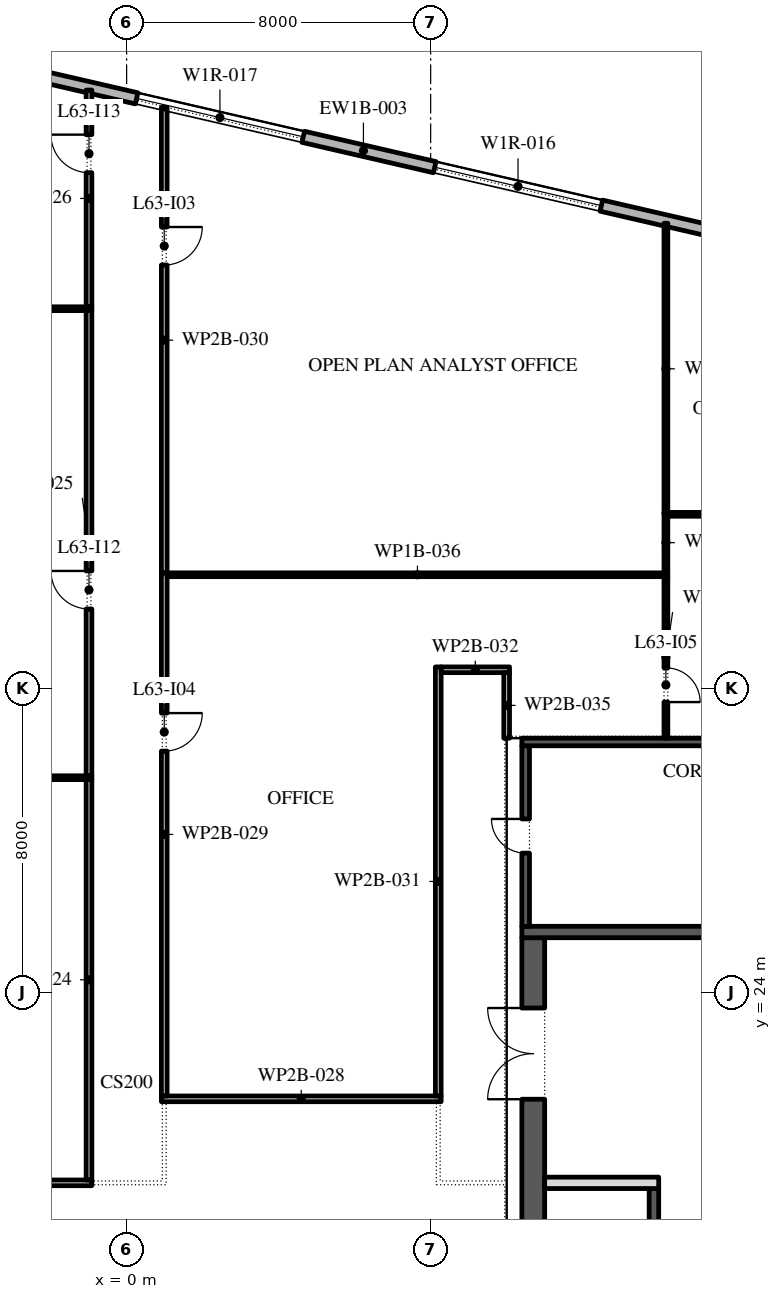
"""IFC4 building model, lengths in metres.
Left out: names, types, materials, properties, quantities, classifications, styles, units other than length and angle.
Written with IfcOpenShell. Run it as: python <this file> out.ifc"""

import sys

from ifc_helpers import new_model, si_unit, direction, frame, frame_2d, origin, place, context, subcontext, project, spatial, rectangle, extrude, element, fill, save


model = new_model("IFC4")
c1 = context("Model", 3, precision=1e-05, world=origin(), true_north=direction((0.0, 1.0)))
c2 = subcontext(c1, "Body", "Model", "MODEL_VIEW")
j1 = project(units=[si_unit("LENGTHUNIT", "METRE"), si_unit("PLANEANGLEUNIT", "RADIAN")], contexts=[c1])
p1 = place(None, origin())
s1 = spatial("IfcSite", under=j1, at=p1, CompositionType="ELEMENT")
p2 = place(p1, origin())
s2 = spatial("IfcBuilding", under=s1, at=p2, CompositionType="ELEMENT")
p3 = place(p2, frame((0.0, 0.0, 289.2)))
s3 = spatial("IfcBuildingStorey", under=s2, at=p3, CompositionType="ELEMENT", Elevation=289.2)
p4 = place(p3, frame((29.616, 40.758, 0.0), z_axis=(0.0, 0.0, 1.0), x_axis=(-0.974370532314, 0.224949029246, 0.0)))
e1 = element("IfcWall", 1, at=p4, inside=s3, PredefinedType="STANDARD", context=c2, shape_type="SweptSolid", body=[
    extrude(rectangle(XDim=48.0, YDim=0.3, at=frame_2d((24.0, 0.0))), origin(), (0.0, 0.0, 1.0), 3.95),
])
p5 = place(p4, frame((1.625, 0.0, 0.45)))
e2 = element("IfcOpeningElement", 2, at=p5, cuts=e1, PredefinedType="OPENING", context=c2, shape_type="SweptSolid", body=[
    extrude(rectangle(XDim=4.5, YDim=2.475, at=frame_2d((2.25, 1.238))), frame((0.0, 0.16, 0.0), z_axis=(0.0, -1.0, 0.0), x_axis=(1.0, 0.0, 0.0)), (0.0, 0.0, 1.0), 0.32),
])
p6 = place(p4, frame((10.575, 0.0, 0.0)))
e3 = element("IfcOpeningElement", 3, at=p6, cuts=e1, PredefinedType="OPENING", context=c2, shape_type="SweptSolid", body=[
    extrude(rectangle(XDim=2.4, YDim=3.5, at=frame_2d((1.2, 1.75))), frame((0.0, 0.16, 0.0), z_axis=(0.0, -1.0, 0.0), x_axis=(1.0, 0.0, 0.0)), (0.0, 0.0, 1.0), 0.32),
])
p7 = place(p4, frame((17.575, 0.0, 0.45)))
e4 = element("IfcOpeningElement", 4, at=p7, cuts=e1, PredefinedType="OPENING", context=c2, shape_type="SweptSolid", body=[
    extrude(rectangle(XDim=4.5, YDim=2.4, at=frame_2d((2.25, 1.2))), frame((0.0, 0.16, 0.0), z_axis=(0.0, -1.0, 0.0), x_axis=(1.0, 0.0, 0.0)), (0.0, 0.0, 1.0), 0.32),
])
p8 = place(p4, frame((25.625, 0.0, 0.45)))
e5 = element("IfcOpeningElement", 5, at=p8, cuts=e1, PredefinedType="OPENING", context=c2, shape_type="SweptSolid", body=[
    extrude(rectangle(XDim=4.5, YDim=2.4, at=frame_2d((2.25, 1.2))), frame((0.0, 0.16, 0.0), z_axis=(0.0, -1.0, 0.0), x_axis=(1.0, 0.0, 0.0)), (0.0, 0.0, 1.0), 0.32),
])
p9 = place(p4, frame((33.675, 0.0, 0.45)))
e6 = element("IfcOpeningElement", 6, at=p9, cuts=e1, PredefinedType="OPENING", context=c2, shape_type="SweptSolid", body=[
    extrude(rectangle(XDim=4.5, YDim=2.4, at=frame_2d((2.25, 1.2))), frame((0.0, 0.16, 0.0), z_axis=(0.0, -1.0, 0.0), x_axis=(1.0, 0.0, 0.0)), (0.0, 0.0, 1.0), 0.32),
])
p10 = place(p4, frame((42.775, 0.0, 0.0)))
e7 = element("IfcOpeningElement", 7, at=p10, cuts=e1, PredefinedType="OPENING", context=c2, shape_type="SweptSolid", body=[
    extrude(rectangle(XDim=2.4, YDim=2.85, at=frame_2d((1.2, 1.425))), frame((0.0, 0.16, 0.0), z_axis=(0.0, -1.0, 0.0), x_axis=(1.0, 0.0, 0.0)), (0.0, 0.0, 1.0), 0.32),
])
p11 = place(p3, frame((10.7, -2.45, 0.0), z_axis=(0.0, 0.0, 1.0), x_axis=(0.0, 1.0, 0.0)))
e8 = element("IfcWall", 8, at=p11, inside=s3, PredefinedType="SHEAR", context=c2, shape_type="SweptSolid", body=[
    extrude(rectangle(XDim=27.9, YDim=0.6, at=frame_2d((13.95, 0.0))), origin(), (0.0, 0.0, 1.0), 3.95),
])
p12 = place(p11, frame((23.65, 0.0, 0.0)))
e9 = element("IfcOpeningElement", 9, at=p12, cuts=e8, PredefinedType="OPENING", context=c2, shape_type="SweptSolid", body=[
    extrude(rectangle(XDim=2.4, YDim=2.1, at=frame_2d((1.2, 1.05))), frame((0.0, 0.31, 0.0), z_axis=(0.0, -1.0, 0.0), x_axis=(1.0, 0.0, 0.0)), (0.0, 0.0, 1.0), 0.62),
])
p13 = place(p11, frame((1.387, 0.0, 0.0)))
e10 = element("IfcOpeningElement", 10, at=p13, cuts=e8, PredefinedType="OPENING", context=c2, shape_type="SweptSolid", body=[
    extrude(rectangle(XDim=0.9, YDim=2.1, at=frame_2d((0.45, 1.05))), frame((0.0, 0.31, 0.0), z_axis=(0.0, -1.0, 0.0), x_axis=(1.0, 0.0, 0.0)), (0.0, 0.0, 1.0), 0.62),
])
p14 = place(p11, frame((4.562, 0.0, 0.0)))
e11 = element("IfcOpeningElement", 11, at=p14, cuts=e8, PredefinedType="OPENING", context=c2, shape_type="SweptSolid", body=[
    extrude(rectangle(XDim=1.0, YDim=2.1, at=frame_2d((0.5, 1.05))), frame((0.0, 0.31, 0.0), z_axis=(0.0, -1.0, 0.0), x_axis=(1.0, 0.0, 0.0)), (0.0, 0.0, 1.0), 0.62),
])
p15 = place(p3, frame((10.4, 25.6, 0.0), z_axis=(0.0, 0.0, 1.0), x_axis=(1.0, 0.0, 0.0)))
e12 = element("IfcWall", 12, at=p15, inside=s3, PredefinedType="SHEAR", context=c2, shape_type="SweptSolid", body=[
    extrude(rectangle(XDim=11.2, YDim=0.3, at=frame_2d((5.6, 0.0))), origin(), (0.0, 0.0, 1.0), 3.95),
])
p16 = place(p3, frame((13.875, -2.45, 0.0), z_axis=(0.0, 0.0, 1.0), x_axis=(0.0, 1.0, 0.0)))
e13 = element("IfcWall", 13, at=p16, inside=s3, PredefinedType="SHEAR", context=c2, shape_type="SweptSolid", body=[
    extrude(rectangle(XDim=21.3, YDim=0.25, at=frame_2d((10.65, 0.0))), origin(), (0.0, 0.0, 1.0), 3.95),
])
p17 = place(p16, frame((17.786, 0.0, 0.0)))
e14 = element("IfcOpeningElement", 14, at=p17, cuts=e13, PredefinedType="OPENING", context=c2, shape_type="SweptSolid", body=[
    extrude(rectangle(XDim=0.9, YDim=2.1, at=frame_2d((0.45, 1.05))), frame((0.0, 0.135, 0.0), z_axis=(0.0, -1.0, 0.0), x_axis=(1.0, 0.0, 0.0)), (0.0, 0.0, 1.0), 0.27),
])
p18 = place(p16, frame((6.971, 0.0, 0.0)))
e15 = element("IfcOpeningElement", 15, at=p18, cuts=e13, PredefinedType="OPENING", context=c2, shape_type="SweptSolid", body=[
    extrude(rectangle(XDim=1.1, YDim=2.1, at=frame_2d((0.55, 1.05))), frame((0.0, 0.135, 0.0), z_axis=(0.0, -1.0, 0.0), x_axis=(1.0, 0.0, 0.0)), (0.0, 0.0, 1.0), 0.27),
])
p19 = place(p16, frame((9.114, 0.0, 0.0)))
e16 = element("IfcOpeningElement", 16, at=p19, cuts=e13, PredefinedType="OPENING", context=c2, shape_type="SweptSolid", body=[
    extrude(rectangle(XDim=1.1, YDim=2.1, at=frame_2d((0.55, 1.05))), frame((0.0, 0.135, 0.0), z_axis=(0.0, -1.0, 0.0), x_axis=(1.0, 0.0, 0.0)), (0.0, 0.0, 1.0), 0.27),
])
p20 = place(p16, frame((11.257, 0.0, 0.0)))
e17 = element("IfcOpeningElement", 17, at=p20, cuts=e13, PredefinedType="OPENING", context=c2, shape_type="SweptSolid", body=[
    extrude(rectangle(XDim=1.1, YDim=2.1, at=frame_2d((0.55, 1.05))), frame((0.0, 0.135, 0.0), z_axis=(0.0, -1.0, 0.0), x_axis=(1.0, 0.0, 0.0)), (0.0, 0.0, 1.0), 0.27),
])
p21 = place(p16, frame((13.4, 0.0, 0.0)))
e18 = element("IfcOpeningElement", 18, at=p21, cuts=e13, PredefinedType="OPENING", context=c2, shape_type="SweptSolid", body=[
    extrude(rectangle(XDim=1.1, YDim=2.1, at=frame_2d((0.55, 1.05))), frame((0.0, 0.135, 0.0), z_axis=(0.0, -1.0, 0.0), x_axis=(1.0, 0.0, 0.0)), (0.0, 0.0, 1.0), 0.27),
])
p22 = place(p3, frame((11.0, 19.0, 0.0), z_axis=(0.0, 0.0, 1.0), x_axis=(1.0, 0.0, 0.0)))
e19 = element("IfcWall", 19, at=p22, inside=s3, PredefinedType="PARTITIONING", context=c2, shape_type="SweptSolid", body=[
    extrude(rectangle(XDim=3.0, YDim=0.3, at=frame_2d((1.5, 0.0))), origin(), (0.0, 0.0, 1.0), 3.95),
])
p23 = place(p3, frame((10.5, 25.75, 0.0), z_axis=(0.0, 0.0, 1.0), x_axis=(0.0, 1.0, 0.0)))
e20 = element("IfcWall", 20, at=p23, inside=s3, PredefinedType="SHEAR", context=c2, shape_type="SweptSolid", body=[
    extrude(rectangle(XDim=4.75, YDim=0.2, at=frame_2d((2.375, 0.0))), origin(), (0.0, 0.0, 1.0), 3.95),
])
p24 = place(p23, frame((1.925, 0.0, 0.0)))
e21 = element("IfcOpeningElement", 21, at=p24, cuts=e20, PredefinedType="OPENING", context=c2, shape_type="SweptSolid", body=[
    extrude(rectangle(XDim=0.9, YDim=2.1, at=frame_2d((0.45, 1.05))), frame((0.0, 0.11, 0.0), z_axis=(0.0, -1.0, 0.0), x_axis=(1.0, 0.0, 0.0)), (0.0, 0.0, 1.0), 0.22),
])
p25 = place(p3, frame((10.4, 30.6, 0.0), z_axis=(0.0, 0.0, 1.0), x_axis=(1.0, 0.0, 0.0)))
e22 = element("IfcWall", 22, at=p25, inside=s3, PredefinedType="SHEAR", context=c2, shape_type="SweptSolid", body=[
    extrude(rectangle(XDim=11.2, YDim=0.2, at=frame_2d((5.6, 0.0))), origin(), (0.0, 0.0, 1.0), 3.95),
])
p26 = place(p3, frame((-9.29, 42.0, 0.0), z_axis=(0.0, 0.0, 1.0), x_axis=(1.0, 0.0, 0.0)))
e23 = element("IfcWall", 23, at=p26, inside=s3, PredefinedType="PARTITIONING", context=c2, shape_type="SweptSolid", body=[
    extrude(rectangle(XDim=8.375, YDim=0.1, at=frame_2d((4.188, 0.0))), origin(), (0.0, 0.0, 1.0), 3.95),
])
p27 = place(p3, frame((-8.275, 19.0, 0.0), z_axis=(0.0, 0.0, 1.0), x_axis=(1.0, 0.0, 0.0)))
e24 = element("IfcWall", 24, at=p27, inside=s3, PredefinedType="PARTITIONING", context=c2, shape_type="SweptSolid", body=[
    extrude(rectangle(XDim=7.36, YDim=0.15, at=frame_2d((3.68, 0.0))), origin(), (0.0, 0.0, 1.0), 3.95),
])
p28 = place(p3, frame((-8.125, 29.66, 0.0), z_axis=(0.0, 0.0, 1.0), x_axis=(1.0, 0.0, 0.0)))
e25 = element("IfcWall", 25, at=p28, inside=s3, PredefinedType="PARTITIONING", context=c2, shape_type="SweptSolid", body=[
    extrude(rectangle(XDim=7.21, YDim=0.1, at=frame_2d((3.605, 0.0))), origin(), (0.0, 0.0, 1.0), 3.95),
])
p29 = place(p3, frame((-0.99, 19.075, 0.0), z_axis=(0.0, 0.0, 1.0), x_axis=(0.0, 1.0, 0.0)))
e26 = element("IfcWall", 26, at=p29, inside=s3, PredefinedType="PARTITIONING", context=c2, shape_type="SweptSolid", body=[
    extrude(rectangle(XDim=10.535, YDim=0.15, at=frame_2d((5.268, 0.0))), origin(), (0.0, 0.0, 1.0), 3.95),
])
p30 = place(p3, frame((-0.99, 29.71, 0.0), z_axis=(0.0, 0.0, 1.0), x_axis=(0.0, 1.0, 0.0)))
e27 = element("IfcWall", 27, at=p30, inside=s3, PredefinedType="PARTITIONING", context=c2, shape_type="SweptSolid", body=[
    extrude(rectangle(XDim=12.24, YDim=0.15, at=frame_2d((6.12, 0.0))), origin(), (0.0, 0.0, 1.0), 3.95),
])
p31 = place(p30, frame((4.39, 0.0, 0.0)))
e28 = element("IfcOpeningElement", 28, at=p31, cuts=e27, PredefinedType="OPENING", context=c2, shape_type="SweptSolid", body=[
    extrude(rectangle(XDim=1.0, YDim=2.1, at=frame_2d((0.5, 1.05))), frame((0.0, 0.085, 0.0), z_axis=(0.0, -1.0, 0.0), x_axis=(1.0, 0.0, 0.0)), (0.0, 0.0, 1.0), 0.17),
])
p32 = place(p3, frame((-0.99, 42.05, 0.0), z_axis=(0.0, 0.0, 1.0), x_axis=(0.0, 1.0, 0.0)))
e29 = element("IfcWall", 29, at=p32, inside=s3, PredefinedType="PARTITIONING", context=c2, shape_type="SweptSolid", body=[
    extrude(rectangle(XDim=5.703, YDim=0.15, at=frame_2d((2.852, 0.0))), origin(), (0.0, 0.0, 1.0), 3.95),
])
p33 = place(p32, frame((3.53, 0.0, 0.0)))
e30 = element("IfcOpeningElement", 30, at=p33, cuts=e29, PredefinedType="OPENING", context=c2, shape_type="SweptSolid", body=[
    extrude(rectangle(XDim=1.0, YDim=2.1, at=frame_2d((0.5, 1.05))), frame((0.0, 0.085, 0.0), z_axis=(0.0, -1.0, 0.0), x_axis=(1.0, 0.0, 0.0)), (0.0, 0.0, 1.0), 0.17),
])
p34 = place(p3, frame((0.915, 21.21, 0.0), z_axis=(0.0, 0.0, 1.0), x_axis=(1.0, 0.0, 0.0)))
e31 = element("IfcWall", 31, at=p34, inside=s3, PredefinedType="PARTITIONING", context=c2, shape_type="SweptSolid", body=[
    extrude(rectangle(XDim=7.36, YDim=0.15, at=frame_2d((3.68, 0.0))), origin(), (0.0, 0.0, 1.0), 3.95),
])
p35 = place(p3, frame((0.99, 35.05, 0.0), z_axis=(0.0, 0.0, 1.0), x_axis=(0.0, -1.0, 0.0)))
e32 = element("IfcWall", 32, at=p35, inside=s3, PredefinedType="PARTITIONING", context=c2, shape_type="SweptSolid", body=[
    extrude(rectangle(XDim=13.765, YDim=0.15, at=frame_2d((6.883, 0.0))), origin(), (0.0, 0.0, 1.0), 3.95),
])
p36 = place(p35, frame((3.69, 0.0, 0.0)))
e33 = element("IfcOpeningElement", 33, at=p36, cuts=e32, PredefinedType="OPENING", context=c2, shape_type="SweptSolid", body=[
    extrude(rectangle(XDim=1.0, YDim=2.1, at=frame_2d((0.5, 1.05))), frame((0.0, 0.085, 0.0), z_axis=(0.0, -1.0, 0.0), x_axis=(1.0, 0.0, 0.0)), (0.0, 0.0, 1.0), 0.17),
])
p37 = place(p3, frame((0.99, 47.296, 0.0), z_axis=(0.0, 0.0, 1.0), x_axis=(0.0, -1.0, 0.0)))
e34 = element("IfcWall", 34, at=p37, inside=s3, PredefinedType="PARTITIONING", context=c2, shape_type="SweptSolid", body=[
    extrude(rectangle(XDim=12.246, YDim=0.15, at=frame_2d((6.123, 0.0))), origin(), (0.0, 0.0, 1.0), 3.95),
])
p38 = place(p37, frame((3.146, 0.0, 0.0)))
e35 = element("IfcOpeningElement", 35, at=p38, cuts=e34, PredefinedType="OPENING", context=c2, shape_type="SweptSolid", body=[
    extrude(rectangle(XDim=1.0, YDim=2.1, at=frame_2d((0.5, 1.05))), frame((0.0, 0.085, 0.0), z_axis=(0.0, -1.0, 0.0), x_axis=(1.0, 0.0, 0.0)), (0.0, 0.0, 1.0), 0.17),
])
p39 = place(p3, frame((8.2, 21.285, 0.0), z_axis=(0.0, 0.0, 1.0), x_axis=(0.0, 1.0, 0.0)))
e36 = element("IfcWall", 36, at=p39, inside=s3, PredefinedType="PARTITIONING", context=c2, shape_type="SweptSolid", body=[
    extrude(rectangle(XDim=11.29, YDim=0.15, at=frame_2d((5.645, 0.0))), origin(), (0.0, 0.0, 1.0), 3.95),
])
p40 = place(p3, frame((8.275, 32.5, 0.0), z_axis=(0.0, 0.0, 1.0), x_axis=(1.0, 0.0, 0.0)))
e37 = element("IfcWall", 37, at=p40, inside=s3, PredefinedType="PARTITIONING", context=c2, shape_type="SweptSolid", body=[
    extrude(rectangle(XDim=1.8, YDim=0.15, at=frame_2d((0.9, 0.0))), origin(), (0.0, 0.0, 1.0), 3.95),
])
p41 = place(p3, frame((10.0, 32.425, 0.0), z_axis=(0.0, 0.0, 1.0), x_axis=(0.0, -1.0, 0.0)))
e38 = element("IfcWall", 38, at=p41, inside=s3, PredefinedType="PARTITIONING", context=c2, shape_type="SweptSolid", body=[
    extrude(rectangle(XDim=1.725, YDim=0.15, at=frame_2d((0.863, 0.0))), origin(), (0.0, 0.0, 1.0), 3.95),
])
p42 = place(p3, frame((14.24, 35.0, 0.0), z_axis=(0.0, 0.0, 1.0), x_axis=(-1.0, 0.0, 0.0)))
e39 = element("IfcWall", 39, at=p42, inside=s3, PredefinedType="PARTITIONING", context=c2, shape_type="SweptSolid", body=[
    extrude(rectangle(XDim=13.175, YDim=0.1, at=frame_2d((6.587, 0.0))), origin(), (0.0, 0.0, 1.0), 3.95),
])
p43 = place(p3, frame((14.19, 34.95, 0.0), z_axis=(0.0, 0.0, 1.0), x_axis=(0.0, -1.0, 0.0)))
e40 = element("IfcWall", 40, at=p43, inside=s3, PredefinedType="PARTITIONING", context=c2, shape_type="SweptSolid", body=[
    extrude(rectangle(XDim=4.25, YDim=0.1, at=frame_2d((2.125, 0.0))), origin(), (0.0, 0.0, 1.0), 2.97),
])
p44 = place(p43, frame((2.4, 0.0, 0.0)))
e41 = element("IfcOpeningElement", 41, at=p44, cuts=e40, PredefinedType="OPENING", context=c2, shape_type="SweptSolid", body=[
    extrude(rectangle(XDim=0.9, YDim=2.1, at=frame_2d((0.45, 1.05))), frame((0.0, 0.06, 0.0), z_axis=(0.0, -1.0, 0.0), x_axis=(1.0, 0.0, 0.0)), (0.0, 0.0, 1.0), 0.12),
])
p45 = place(p3, frame((14.19, 36.64, 0.0), z_axis=(0.0, 0.0, 1.0), x_axis=(0.0, -1.0, 0.0)))
e42 = element("IfcWall", 42, at=p45, inside=s3, PredefinedType="PARTITIONING", context=c2, shape_type="SweptSolid", body=[
    extrude(rectangle(XDim=1.59, YDim=0.1, at=frame_2d((0.795, 0.0))), origin(), (0.0, 0.0, 1.0), 2.97),
])
p46 = place(p3, frame((14.24, 36.59, 0.0), z_axis=(0.0, 0.0, 1.0), x_axis=(1.0, 0.0, 0.0)))
e43 = element("IfcWall", 43, at=p46, inside=s3, PredefinedType="PARTITIONING", context=c2, shape_type="SweptSolid", body=[
    extrude(rectangle(XDim=7.76, YDim=0.1, at=frame_2d((3.88, 0.0))), origin(), (0.0, 0.0, 1.0), 3.95),
])
p47 = place(p3, frame((14.19, 44.248, 0.0), z_axis=(0.0, 0.0, 1.0), x_axis=(0.0, -1.0, 0.0)))
e44 = element("IfcWall", 44, at=p47, inside=s3, PredefinedType="PARTITIONING", context=c2, shape_type="SweptSolid", body=[
    extrude(rectangle(XDim=7.658, YDim=0.1, at=frame_2d((3.829, 0.0))), origin(), (0.0, 0.0, 1.0), 2.97),
])
p48 = place(p7, origin())
e45 = element("IfcWindow", 45, at=p48, inside=s3, PartitioningType="DOUBLE_PANEL_VERTICAL", PredefinedType="WINDOW", context=c2, shape_type="SweptSolid", body=[
    extrude(rectangle(XDim=4.5, YDim=2.4, at=frame_2d((2.25, 1.2))), frame((0.0, 0.03, 0.0), z_axis=(0.0, -1.0, 0.0), x_axis=(1.0, 0.0, 0.0)), (0.0, 0.0, 1.0), 0.06),
])
fill(e4, e45)
p49 = place(p8, origin())
e46 = element("IfcWindow", 46, at=p49, inside=s3, PartitioningType="DOUBLE_PANEL_VERTICAL", PredefinedType="WINDOW", context=c2, shape_type="SweptSolid", body=[
    extrude(rectangle(XDim=4.5, YDim=2.4, at=frame_2d((2.25, 1.2))), frame((0.0, 0.03, 0.0), z_axis=(0.0, -1.0, 0.0), x_axis=(1.0, 0.0, 0.0)), (0.0, 0.0, 1.0), 0.06),
])
fill(e5, e46)
p50 = place(p12, origin())
e47 = element("IfcDoor", 47, at=p50, inside=s3, OperationType="DOUBLE_DOOR_SINGLE_SWING", PredefinedType="DOOR", context=c2, shape_type="SweptSolid", body=[
    extrude(rectangle(XDim=2.4, YDim=2.1, at=frame_2d((1.2, 1.05))), frame((0.0, 0.025, 0.0), z_axis=(0.0, -1.0, 0.0), x_axis=(1.0, 0.0, 0.0)), (0.0, 0.0, 1.0), 0.05),
])
fill(e9, e47)
p51 = place(p24, origin())
e48 = element("IfcDoor", 48, at=p51, inside=s3, OperationType="SINGLE_SWING_LEFT", PredefinedType="DOOR", context=c2, shape_type="SweptSolid", body=[
    extrude(rectangle(XDim=0.9, YDim=2.1, at=frame_2d((0.45, 1.05))), frame((0.0, -0.05, 0.0), z_axis=(0.0, -1.0, 0.0), x_axis=(1.0, 0.0, 0.0)), (0.0, 0.0, 1.0), 0.05),
])
fill(e21, e48)
p52 = place(p38, origin())
e49 = element("IfcDoor", 49, at=p52, inside=s3, OperationType="SINGLE_SWING_RIGHT", PredefinedType="DOOR", context=c2, shape_type="SweptSolid", body=[
    extrude(rectangle(XDim=1.0, YDim=2.1, at=frame_2d((0.5, 1.05))), frame((0.0, 0.025, 0.0), z_axis=(0.0, -1.0, 0.0), x_axis=(1.0, 0.0, 0.0)), (0.0, 0.0, 1.0), 0.05),
])
fill(e35, e49)
p53 = place(p36, origin())
e50 = element("IfcDoor", 50, at=p53, inside=s3, OperationType="SINGLE_SWING_RIGHT", PredefinedType="DOOR", context=c2, shape_type="SweptSolid", body=[
    extrude(rectangle(XDim=1.0, YDim=2.1, at=frame_2d((0.5, 1.05))), frame((0.0, 0.025, 0.0), z_axis=(0.0, -1.0, 0.0), x_axis=(1.0, 0.0, 0.0)), (0.0, 0.0, 1.0), 0.05),
])
fill(e33, e50)
p54 = place(p44, origin())
e51 = element("IfcDoor", 51, at=p54, inside=s3, OperationType="SINGLE_SWING_LEFT", PredefinedType="DOOR", context=c2, shape_type="SweptSolid", body=[
    extrude(rectangle(XDim=0.9, YDim=2.1, at=frame_2d((0.45, 1.05))), frame((0.0, 0.025, 0.0), z_axis=(0.0, -1.0, 0.0), x_axis=(1.0, 0.0, 0.0)), (0.0, 0.0, 1.0), 0.05),
])
fill(e41, e51)
p55 = place(p31, origin())
e52 = element("IfcDoor", 52, at=p55, inside=s3, OperationType="SINGLE_SWING_LEFT", PredefinedType="DOOR", context=c2, shape_type="SweptSolid", body=[
    extrude(rectangle(XDim=1.0, YDim=2.1, at=frame_2d((0.5, 1.05))), frame((0.0, 0.025, 0.0), z_axis=(0.0, -1.0, 0.0), x_axis=(1.0, 0.0, 0.0)), (0.0, 0.0, 1.0), 0.05),
])
fill(e28, e52)
p56 = place(p33, origin())
e53 = element("IfcDoor", 53, at=p56, inside=s3, OperationType="SINGLE_SWING_LEFT", PredefinedType="DOOR", context=c2, shape_type="SweptSolid", body=[
    extrude(rectangle(XDim=1.0, YDim=2.1, at=frame_2d((0.5, 1.05))), frame((0.0, 0.025, 0.0), z_axis=(0.0, -1.0, 0.0), x_axis=(1.0, 0.0, 0.0)), (0.0, 0.0, 1.0), 0.05),
])
fill(e30, e53)
save(model, sys.argv[1])
